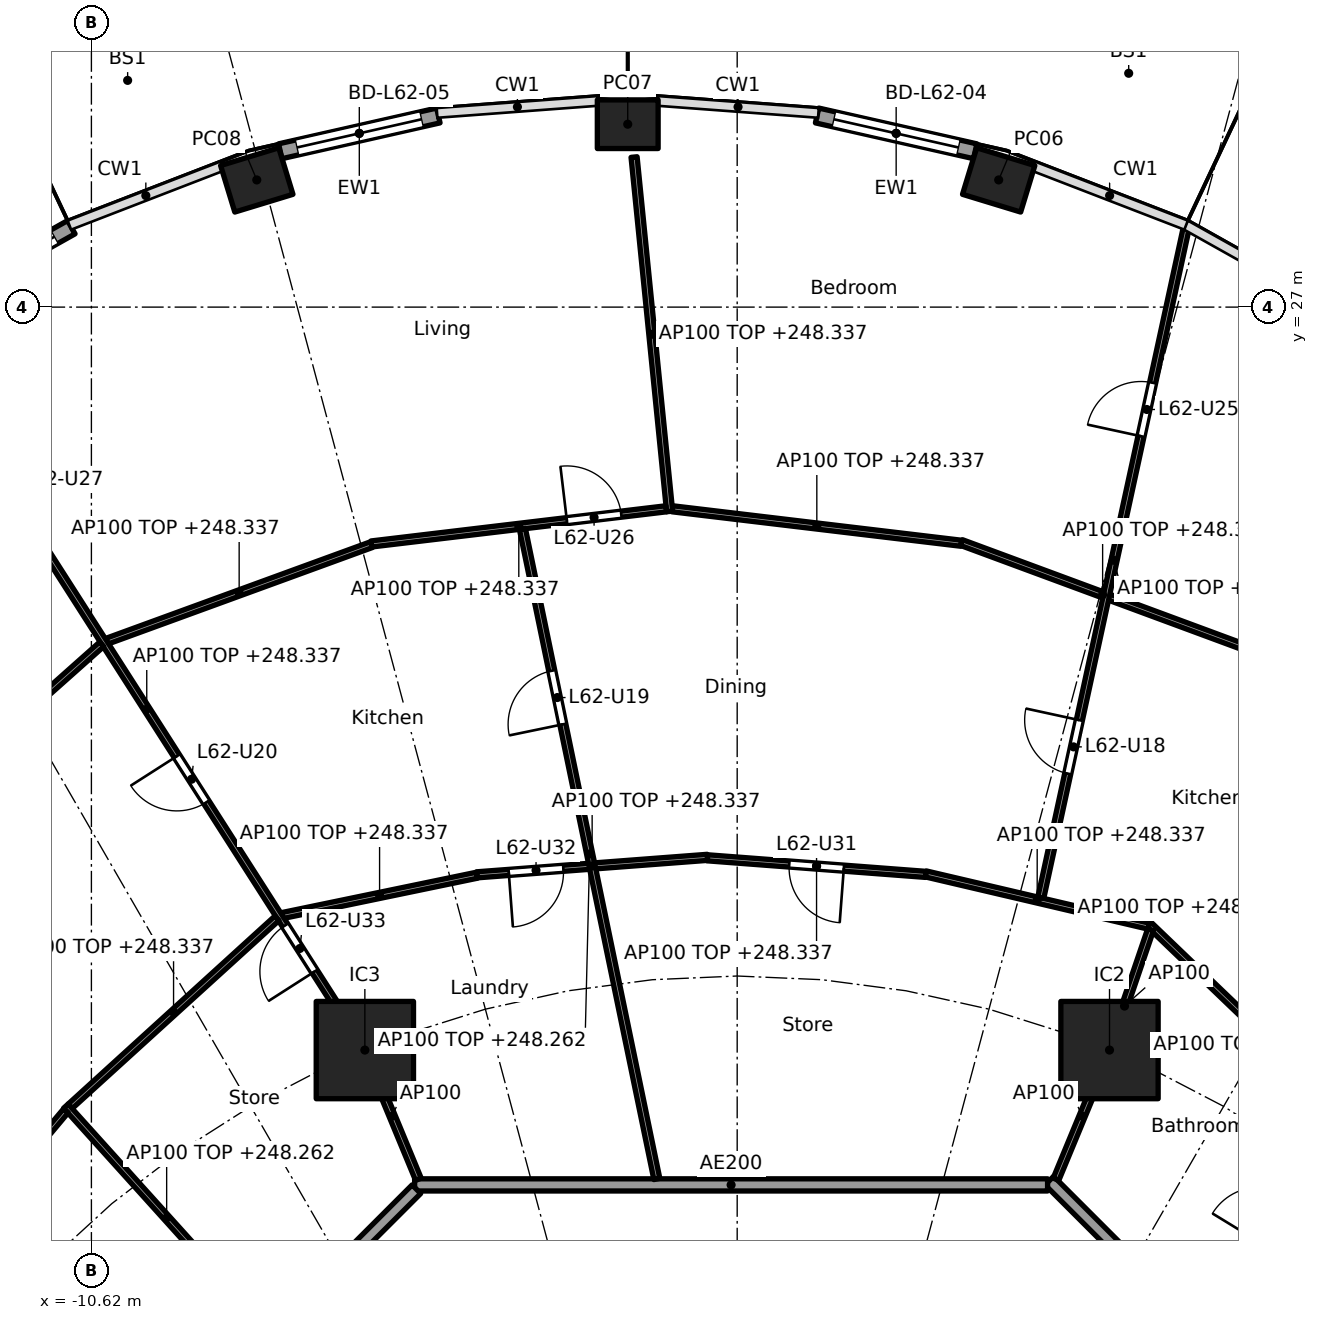
"""IFC4 building model, lengths in metres.
Left out: names, types, materials, properties, quantities, classifications, styles, units other than length and angle.
Written with IfcOpenShell. Run it as: python <this file> out.ifc"""

import sys

from ifc_helpers import new_model, si_unit, direction, frame, frame_2d, origin, origin_2d, place, context, subcontext, project, spatial, rectangle, hollow_rectangle, extrude, element, fill, save


model = new_model("IFC4")
c1 = context("Model", 3, precision=1e-05, world=origin(), true_north=direction((0.0, 1.0)))
c2 = subcontext(c1, "Body", "Model", "MODEL_VIEW")
j1 = project(units=[si_unit("LENGTHUNIT", "METRE"), si_unit("PLANEANGLEUNIT", "RADIAN")], contexts=[c1])
p1 = place(None, origin())
s1 = spatial("IfcSite", under=j1, at=p1, CompositionType="ELEMENT")
p2 = place(p1, origin())
s2 = spatial("IfcBuilding", under=s1, at=p2, CompositionType="ELEMENT")
p3 = place(p2, frame((0.0, 0.0, 245.5)))
s3 = spatial("IfcBuildingStorey", under=s2, at=p3, CompositionType="ELEMENT", Elevation=245.5)
for number, where, z_axis, x_axis in (
    (1, (4.3, 29.092, 0.0), (0.0, 0.0, 1.0), (-0.957, 0.292, 0.0)),
    (2, (-1.8, 30.008, 0.0), (0.0, 0.0, 1.0), (-1.0, 0.0, 0.0)),
    (3, (-7.9, 29.092, 0.0), (0.0, 0.0, 1.0), (-0.957, -0.292, 0.0)),
):
    element("IfcColumn", number, at=place(p3, frame(where, z_axis=z_axis, x_axis=x_axis)), inside=s3, PredefinedType="COLUMN", context=c2, shape_type="SweptSolid", body=[
        extrude(hollow_rectangle(XDim=1.0, YDim=0.8, WallThickness=0.032, at=origin_2d()), origin(), (0.0, 0.0, 1.0), 3.7),
    ])
for number, where, z_axis, x_axis in (
    (4, (6.123, 14.782, 0.0), (0.0, 0.0, 1.0), (1.0, 0.0, 0.0)),
    (5, (-6.123, 14.782, 0.0), (0.0, 0.0, 1.0), (1.0, 0.0, 0.0)),
):
    element("IfcColumn", number, at=place(p3, frame(where, z_axis=z_axis, x_axis=x_axis)), inside=s3, PredefinedType="COLUMN", context=c2, shape_type="SweptSolid", body=[
        extrude(rectangle(XDim=1.6, YDim=1.6, at=origin_2d()), origin(), (0.0, 0.0, 1.0), 3.7),
    ])
p4 = place(p3, frame((1.314, 30.151, 0.0), z_axis=(0.0, 0.0, 1.0), x_axis=(0.975324089124, -0.220777990694, 0.0)))
e6 = element("IfcWall", 6, at=p4, inside=s3, PredefinedType="SOLIDWALL", context=c2, shape_type="SweptSolid", body=[
    extrude(rectangle(XDim=2.666, YDim=0.25, at=frame_2d((1.333, 0.0))), origin(), (0.0, 0.0, 1.0), 3.44),
])
p5 = place(p4, frame((0.283, 0.0, 0.0)))
e7 = element("IfcOpeningElement", 7, at=p5, cuts=e6, PredefinedType="OPENING", context=c2, shape_type="SweptSolid", body=[
    extrude(rectangle(XDim=2.1, YDim=2.4, at=frame_2d((1.05, 1.2))), frame((0.0, 0.135, 0.0), z_axis=(0.0, -1.0, 0.0), x_axis=(1.0, 0.0, 0.0)), (0.0, 0.0, 1.0), 0.27),
])
p6 = place(p3, frame((-7.514, 29.563, 0.0), z_axis=(0.0, 0.0, 1.0), x_axis=(0.975324089124, 0.220777990694, 0.0)))
e8 = element("IfcWall", 8, at=p6, inside=s3, PredefinedType="SOLIDWALL", context=c2, shape_type="SweptSolid", body=[
    extrude(rectangle(XDim=2.666, YDim=0.25, at=frame_2d((1.333, 0.0))), origin(), (0.0, 0.0, 1.0), 3.44),
])
p7 = place(p6, frame((0.283, 0.0, 0.0)))
e9 = element("IfcOpeningElement", 9, at=p7, cuts=e8, PredefinedType="OPENING", context=c2, shape_type="SweptSolid", body=[
    extrude(rectangle(XDim=2.1, YDim=2.4, at=frame_2d((1.05, 1.2))), frame((0.0, 0.135, 0.0), z_axis=(0.0, -1.0, 0.0), x_axis=(1.0, 0.0, 0.0)), (0.0, 0.0, 1.0), 0.27),
])
p8 = place(p3, frame((-13.338, 26.974, 0.0), z_axis=(0.0, 0.0, 1.0), x_axis=(0.872101280701, 0.489325409313, 0.0)))
e10 = element("IfcWall", 10, at=p8, inside=s3, PredefinedType="SOLIDWALL", context=c2, shape_type="SweptSolid", body=[
    extrude(rectangle(XDim=2.738, YDim=0.25, at=frame_2d((1.369, 0.0))), origin(), (0.0, 0.0, 1.0), 3.44),
])
p9 = place(p8, frame((0.319, 0.0, 0.0)))
e11 = element("IfcOpeningElement", 11, at=p9, cuts=e10, PredefinedType="OPENING", context=c2, shape_type="SweptSolid", body=[
    extrude(rectangle(XDim=2.1, YDim=2.4, at=frame_2d((1.05, 1.2))), frame((0.0, 0.135, 0.0), z_axis=(0.0, -1.0, 0.0), x_axis=(1.0, 0.0, 0.0)), (0.0, 0.0, 1.0), 0.27),
])
p10 = place(p3, frame((12.635, 5.134, 0.0), z_axis=(0.0, 0.0, 1.0), x_axis=(-0.707106781187, 0.707106781187, 0.0)))
e12 = element("IfcWall", 12, at=p10, inside=s3, PredefinedType="PARTITIONING", context=c2, shape_type="SweptSolid", body=[
    extrude(rectangle(XDim=10.609, YDim=0.2, at=frame_2d((5.305, 0.0))), origin(), (0.0, 0.0, 1.0), 3.44),
])
p11 = place(p10, frame((4.804, 0.0, 0.0)))
e13 = element("IfcOpeningElement", 13, at=p11, cuts=e12, PredefinedType="OPENING", context=c2, shape_type="SweptSolid", body=[
    extrude(rectangle(XDim=1.0, YDim=2.1, at=frame_2d((0.5, 1.05))), frame((0.0, 0.11, 0.0), z_axis=(0.0, -1.0, 0.0), x_axis=(1.0, 0.0, 0.0)), (0.0, 0.0, 1.0), 0.22),
])
p12 = place(p3, frame((5.104, 12.565, 0.0), z_axis=(0.0, 0.0, 1.0), x_axis=(-1.0, 0.0, 0.0)))
e14 = element("IfcWall", 14, at=p12, inside=s3, PredefinedType="PARTITIONING", context=c2, shape_type="SweptSolid", body=[
    extrude(rectangle(XDim=10.409, YDim=0.2, at=frame_2d((5.205, 0.0))), origin(), (0.0, 0.0, 1.0), 3.44),
])
p13 = place(p3, frame((-5.275, 12.494, 0.0), z_axis=(0.0, 0.0, 1.0), x_axis=(-0.707106781187, -0.707106781187, 0.0)))
e15 = element("IfcWall", 15, at=p13, inside=s3, PredefinedType="PARTITIONING", context=c2, shape_type="SweptSolid", body=[
    extrude(rectangle(XDim=10.209, YDim=0.2, at=frame_2d((5.104, 0.0))), origin(), (0.0, 0.0, 1.0), 3.44),
])
p14 = place(p3, frame((7.71, 10.197, 0.0), z_axis=(0.0, 0.0, 1.0), x_axis=(0.521477621335, 0.853264959111, 0.0)))
e16 = element("IfcWall", 16, at=p14, inside=s3, PredefinedType="PARTITIONING", context=c2, shape_type="SweptSolid", body=[
    extrude(rectangle(XDim=8.941, YDim=0.1, at=frame_2d((4.471, 0.0))), origin(), (0.0, 0.0, 1.0), 2.762),
])
p15 = place(p14, frame((1.675, 0.0, 0.0)))
e17 = element("IfcOpeningElement", 17, at=p15, cuts=e16, PredefinedType="OPENING", context=c2, shape_type="SweptSolid", body=[
    extrude(rectangle(XDim=0.9, YDim=2.1, at=frame_2d((0.45, 1.05))), frame((0.0, 0.06, 0.0), z_axis=(0.0, -1.0, 0.0), x_axis=(1.0, 0.0, 0.0)), (0.0, 0.0, 1.0), 0.12),
])
p16 = place(p14, frame((6.121, 0.0, 0.0)))
e18 = element("IfcOpeningElement", 18, at=p16, cuts=e16, PredefinedType="OPENING", context=c2, shape_type="SweptSolid", body=[
    extrude(rectangle(XDim=0.9, YDim=2.1, at=frame_2d((0.45, 1.05))), frame((0.0, 0.06, 0.0), z_axis=(0.0, -1.0, 0.0), x_axis=(1.0, 0.0, 0.0)), (0.0, 0.0, 1.0), 0.12),
])
p17 = place(p3, frame((9.89, 13.858, 0.0), z_axis=(0.0, 0.0, 1.0), x_axis=(-0.72167233993, 0.692234811159, 0.0)))
e19 = element("IfcWall", 19, at=p17, inside=s3, PredefinedType="PARTITIONING", context=c2, shape_type="SweptSolid", body=[
    extrude(rectangle(XDim=4.313, YDim=0.1, at=frame_2d((2.156, 0.0))), origin(), (0.0, 0.0, 1.0), 2.837),
])
p18 = place(p3, frame((5.243, 12.657, 0.0), z_axis=(0.0, 0.0, 1.0), x_axis=(0.382719158442, 0.923864733477, 0.0)))
e20 = element("IfcWall", 20, at=p18, inside=s3, PredefinedType="PARTITIONING", context=c2, shape_type="SweptSolid", body=[
    extrude(rectangle(XDim=2.25, YDim=0.1, at=frame_2d((1.125, 0.0))), origin(), (0.0, 0.0, 1.0), 3.44),
])
p19 = place(p3, frame((6.139, 14.829, 0.0), z_axis=(0.0, 0.0, 1.0), x_axis=(0.32278593828, 0.946471995385, 0.0)))
e21 = element("IfcWall", 21, at=p19, inside=s3, PredefinedType="PARTITIONING", context=c2, shape_type="SweptSolid", body=[
    extrude(rectangle(XDim=2.042, YDim=0.1, at=frame_2d((1.021, 0.0))), origin(), (0.0, 0.0, 1.0), 3.44),
])
p20 = place(p3, frame((6.766, 16.82, 0.0), z_axis=(0.0, 0.0, 1.0), x_axis=(-0.973620139133, 0.228174986961, 0.0)))
e22 = element("IfcWall", 22, at=p20, inside=s3, PredefinedType="PARTITIONING", context=c2, shape_type="SweptSolid", body=[
    extrude(rectangle(XDim=3.763, YDim=0.1, at=frame_2d((1.882, 0.0))), origin(), (0.0, 0.0, 1.0), 2.837),
])
p21 = place(p3, frame((8.331, 21.411, 0.0), z_axis=(0.0, 0.0, 1.0), x_axis=(-0.937892657706, 0.346925586575, 0.0)))
e23 = element("IfcWall", 23, at=p21, inside=s3, PredefinedType="PARTITIONING", context=c2, shape_type="SweptSolid", body=[
    extrude(rectangle(XDim=4.95, YDim=0.1, at=frame_2d((2.475, 0.0))), origin(), (0.0, 0.0, 1.0), 2.837),
])
p22 = place(p3, frame((4.993, 17.287, 0.0), z_axis=(0.0, 0.0, 1.0), x_axis=(0.21221094606, 0.977223881397, 0.0)))
e24 = element("IfcWall", 24, at=p22, inside=s3, PredefinedType="PARTITIONING", context=c2, shape_type="SweptSolid", body=[
    extrude(rectangle(XDim=11.355, YDim=0.1, at=frame_2d((5.677, 0.0))), origin(), (0.0, 0.0, 1.0), 2.983),
])
p23 = place(p22, frame((2.089, 0.0, 0.0)))
e25 = element("IfcOpeningElement", 25, at=p23, cuts=e24, PredefinedType="OPENING", context=c2, shape_type="SweptSolid", body=[
    extrude(rectangle(XDim=0.9, YDim=2.1, at=frame_2d((0.45, 1.05))), frame((0.0, 0.06, 0.0), z_axis=(0.0, -1.0, 0.0), x_axis=(1.0, 0.0, 0.0)), (0.0, 0.0, 1.0), 0.12),
])
p24 = place(p22, frame((7.767, 0.0, 0.0)))
e26 = element("IfcOpeningElement", 26, at=p24, cuts=e24, PredefinedType="OPENING", context=c2, shape_type="SweptSolid", body=[
    extrude(rectangle(XDim=0.9, YDim=2.1, at=frame_2d((0.45, 1.05))), frame((0.0, 0.06, 0.0), z_axis=(0.0, -1.0, 0.0), x_axis=(1.0, 0.0, 0.0)), (0.0, 0.0, 1.0), 0.12),
])
p25 = place(p3, frame((3.101, 17.671, 0.0), z_axis=(0.0, 0.0, 1.0), x_axis=(-0.997133705575, 0.075659587668, 0.0)))
e27 = element("IfcWall", 27, at=p25, inside=s3, PredefinedType="PARTITIONING", context=c2, shape_type="SweptSolid", body=[
    extrude(rectangle(XDim=3.601, YDim=0.1, at=frame_2d((1.801, 0.0))), origin(), (0.0, 0.0, 1.0), 2.837),
])
p26 = place(p25, frame((1.351, 0.0, 0.0)))
e28 = element("IfcOpeningElement", 28, at=p26, cuts=e27, PredefinedType="OPENING", context=c2, shape_type="SweptSolid", body=[
    extrude(rectangle(XDim=0.9, YDim=2.1, at=frame_2d((0.45, 1.05))), frame((0.0, 0.06, 0.0), z_axis=(0.0, -1.0, 0.0), x_axis=(1.0, 0.0, 0.0)), (0.0, 0.0, 1.0), 0.12),
])
p27 = place(p3, frame((3.686, 23.117, 0.0), z_axis=(0.0, 0.0, 1.0), x_axis=(-0.992965872314, 0.11840091393, 0.0)))
e29 = element("IfcWall", 29, at=p27, inside=s3, PredefinedType="PARTITIONING", context=c2, shape_type="SweptSolid", body=[
    extrude(rectangle(XDim=4.786, YDim=0.1, at=frame_2d((2.393, 0.0))), origin(), (0.0, 0.0, 1.0), 2.837),
])
p28 = place(p3, frame((-0.49, 17.951, 0.0), z_axis=(0.0, 0.0, 1.0), x_axis=(-0.99713329702, -0.075664971907, 0.0)))
e30 = element("IfcWall", 30, at=p28, inside=s3, PredefinedType="PARTITIONING", context=c2, shape_type="SweptSolid", body=[
    extrude(rectangle(XDim=3.801, YDim=0.1, at=frame_2d((1.9, 0.0))), origin(), (0.0, 0.0, 1.0), 2.837),
])
p29 = place(p28, frame((2.376, 0.0, 0.0)))
e31 = element("IfcOpeningElement", 31, at=p29, cuts=e30, PredefinedType="OPENING", context=c2, shape_type="SweptSolid", body=[
    extrude(rectangle(XDim=0.9, YDim=2.1, at=frame_2d((0.45, 1.05))), frame((0.0, 0.06, 0.0), z_axis=(0.0, -1.0, 0.0), x_axis=(1.0, 0.0, 0.0)), (0.0, 0.0, 1.0), 0.12),
])
p30 = place(p3, frame((-1.111, 23.64, 0.0), z_axis=(0.0, 0.0, 1.0), x_axis=(-0.099784339691, 0.995009088176, 0.0)))
e32 = element("IfcWall", 32, at=p30, inside=s3, PredefinedType="PARTITIONING", context=c2, shape_type="SweptSolid", body=[
    extrude(rectangle(XDim=5.857, YDim=0.1, at=frame_2d((2.929, 0.0))), origin(), (0.0, 0.0, 1.0), 2.837),
])
p31 = place(p3, frame((-1.166, 23.683, 0.0), z_axis=(0.0, 0.0, 1.0), x_axis=(-0.992961712415, -0.118435795593, 0.0)))
e33 = element("IfcWall", 33, at=p31, inside=s3, PredefinedType="PARTITIONING", context=c2, shape_type="SweptSolid", body=[
    extrude(rectangle(XDim=4.885, YDim=0.1, at=frame_2d((2.443, 0.0))), origin(), (0.0, 0.0, 1.0), 2.837),
])
p32 = place(p31, frame((0.746, 0.0, 0.0)))
e34 = element("IfcOpeningElement", 34, at=p32, cuts=e33, PredefinedType="OPENING", context=c2, shape_type="SweptSolid", body=[
    extrude(rectangle(XDim=0.9, YDim=2.1, at=frame_2d((0.45, 1.05))), frame((0.0, 0.06, 0.0), z_axis=(0.0, -1.0, 0.0), x_axis=(1.0, 0.0, 0.0)), (0.0, 0.0, 1.0), 0.12),
])
p33 = place(p3, frame((-1.321, 12.663, 0.0), z_axis=(0.0, 0.0, 1.0), x_axis=(-0.202499831859, 0.979282297449, 0.0)))
e35 = element("IfcWall", 35, at=p33, inside=s3, PredefinedType="PARTITIONING", context=c2, shape_type="SweptSolid", body=[
    extrude(rectangle(XDim=10.915, YDim=0.1, at=frame_2d((5.457, 0.0))), origin(), (0.0, 0.0, 1.0), 2.762),
])
p34 = place(p33, frame((7.634, 0.0, 0.0)))
e36 = element("IfcOpeningElement", 36, at=p34, cuts=e35, PredefinedType="OPENING", context=c2, shape_type="SweptSolid", body=[
    extrude(rectangle(XDim=0.9, YDim=2.1, at=frame_2d((0.45, 1.05))), frame((0.0, 0.06, 0.0), z_axis=(0.0, -1.0, 0.0), x_axis=(1.0, 0.0, 0.0)), (0.0, 0.0, 1.0), 0.12),
])
p35 = place(p3, frame((-4.28, 17.657, 0.0), z_axis=(0.0, 0.0, 1.0), x_axis=(-0.979205232861, -0.202872156637, 0.0)))
e37 = element("IfcWall", 37, at=p35, inside=s3, PredefinedType="PARTITIONING", context=c2, shape_type="SweptSolid", body=[
    extrude(rectangle(XDim=3.271, YDim=0.1, at=frame_2d((1.635, 0.0))), origin(), (0.0, 0.0, 1.0), 2.837),
])
p36 = place(p3, frame((-6.014, 23.094, 0.0), z_axis=(0.0, 0.0, 1.0), x_axis=(-0.939417400947, -0.342775359089, 0.0)))
e38 = element("IfcWall", 38, at=p36, inside=s3, PredefinedType="PARTITIONING", context=c2, shape_type="SweptSolid", body=[
    extrude(rectangle(XDim=4.633, YDim=0.1, at=frame_2d((2.316, 0.0))), origin(), (0.0, 0.0, 1.0), 2.837),
])
p37 = place(p3, frame((-5.243, 12.657, 0.0), z_axis=(0.0, 0.0, 1.0), x_axis=(-0.382757529444, 0.923848837015, 0.0)))
e39 = element("IfcWall", 39, at=p37, inside=s3, PredefinedType="PARTITIONING", context=c2, shape_type="SweptSolid", body=[
    extrude(rectangle(XDim=2.25, YDim=0.1, at=frame_2d((1.125, 0.0))), origin(), (0.0, 0.0, 1.0), 3.44),
])
p38 = place(p3, frame((-6.15, 14.824, 0.0), z_axis=(0.0, 0.0, 1.0), x_axis=(-0.538870687577, 0.842388498301, 0.0)))
e40 = element("IfcWall", 40, at=p38, inside=s3, PredefinedType="PARTITIONING", context=c2, shape_type="SweptSolid", body=[
    extrude(rectangle(XDim=13.213, YDim=0.1, at=frame_2d((6.606, 0.0))), origin(), (0.0, 0.0, 1.0), 2.837),
])
p39 = place(p38, frame((4.787, 0.0, 0.0)))
e41 = element("IfcOpeningElement", 41, at=p39, cuts=e40, PredefinedType="OPENING", context=c2, shape_type="SweptSolid", body=[
    extrude(rectangle(XDim=0.9, YDim=2.1, at=frame_2d((0.45, 1.05))), frame((0.0, 0.06, 0.0), z_axis=(0.0, -1.0, 0.0), x_axis=(1.0, 0.0, 0.0)), (0.0, 0.0, 1.0), 0.12),
])
p40 = place(p38, frame((10.112, 0.0, 0.0)))
e42 = element("IfcOpeningElement", 42, at=p40, cuts=e40, PredefinedType="OPENING", context=c2, shape_type="SweptSolid", body=[
    extrude(rectangle(XDim=0.9, YDim=2.1, at=frame_2d((0.45, 1.05))), frame((0.0, 0.06, 0.0), z_axis=(0.0, -1.0, 0.0), x_axis=(1.0, 0.0, 0.0)), (0.0, 0.0, 1.0), 0.12),
])
p41 = place(p38, frame((1.483, 0.0, 0.0)))
e43 = element("IfcOpeningElement", 43, at=p41, cuts=e40, PredefinedType="OPENING", context=c2, shape_type="SweptSolid", body=[
    extrude(rectangle(XDim=0.9, YDim=2.1, at=frame_2d((0.45, 1.05))), frame((0.0, 0.06, 0.0), z_axis=(0.0, -1.0, 0.0), x_axis=(1.0, 0.0, 0.0)), (0.0, 0.0, 1.0), 0.12),
])
p42 = place(p3, frame((-7.568, 16.95, 0.0), z_axis=(0.0, 0.0, 1.0), x_axis=(-0.739848749506, -0.672773236577, 0.0)))
e44 = element("IfcWall", 44, at=p42, inside=s3, PredefinedType="PARTITIONING", context=c2, shape_type="SweptSolid", body=[
    extrude(rectangle(XDim=4.597, YDim=0.1, at=frame_2d((2.299, 0.0))), origin(), (0.0, 0.0, 1.0), 2.837),
])
p43 = place(p3, frame((-10.45, 21.455, 0.0), z_axis=(0.0, 0.0, 1.0), x_axis=(-0.747155565726, -0.664649201162, 0.0)))
e45 = element("IfcWall", 45, at=p43, inside=s3, PredefinedType="PARTITIONING", context=c2, shape_type="SweptSolid", body=[
    extrude(rectangle(XDim=5.575, YDim=0.1, at=frame_2d((2.788, 0.0))), origin(), (0.0, 0.0, 1.0), 2.837),
])
p44 = place(p3, frame((-7.725, 10.186, 0.0), z_axis=(0.0, 0.0, 1.0), x_axis=(-0.669817301526, 0.742525947409, 0.0)))
e46 = element("IfcWall", 46, at=p44, inside=s3, PredefinedType="PARTITIONING", context=c2, shape_type="SweptSolid", body=[
    extrude(rectangle(XDim=4.949, YDim=0.1, at=frame_2d((2.475, 0.0))), origin(), (0.0, 0.0, 1.0), 2.762),
])
p45 = place(p3, frame((-11.039, 13.785, 0.0), z_axis=(0.0, 0.0, 1.0), x_axis=(-0.642258090087, -0.766488451131, 0.0)))
e47 = element("IfcWall", 47, at=p45, inside=s3, PredefinedType="PARTITIONING", context=c2, shape_type="SweptSolid", body=[
    extrude(rectangle(XDim=4.361, YDim=0.1, at=frame_2d((2.18, 0.0))), origin(), (0.0, 0.0, 1.0), 2.837),
])
p46 = place(p5, origin())
e48 = element("IfcDoor", 48, at=p46, inside=s3, OperationType="SLIDING_TO_LEFT", PredefinedType="DOOR", context=c2, shape_type="SweptSolid", body=[
    extrude(rectangle(XDim=2.1, YDim=2.4, at=frame_2d((1.05, 1.2))), frame((0.0, 0.025, 0.0), z_axis=(0.0, -1.0, 0.0), x_axis=(1.0, 0.0, 0.0)), (0.0, 0.0, 1.0), 0.05),
])
fill(e7, e48)
p47 = place(p7, origin())
e49 = element("IfcDoor", 49, at=p47, inside=s3, OperationType="SLIDING_TO_LEFT", PredefinedType="DOOR", context=c2, shape_type="SweptSolid", body=[
    extrude(rectangle(XDim=2.1, YDim=2.4, at=frame_2d((1.05, 1.2))), frame((0.0, 0.025, 0.0), z_axis=(0.0, -1.0, 0.0), x_axis=(1.0, 0.0, 0.0)), (0.0, 0.0, 1.0), 0.05),
])
fill(e9, e49)
p48 = place(p9, origin())
e50 = element("IfcDoor", 50, at=p48, inside=s3, OperationType="SLIDING_TO_LEFT", PredefinedType="DOOR", context=c2, shape_type="SweptSolid", body=[
    extrude(rectangle(XDim=2.1, YDim=2.4, at=frame_2d((1.05, 1.2))), frame((0.0, 0.025, 0.0), z_axis=(0.0, -1.0, 0.0), x_axis=(1.0, 0.0, 0.0)), (0.0, 0.0, 1.0), 0.05),
])
fill(e11, e50)
p49 = place(p23, origin())
e51 = element("IfcDoor", 51, at=p49, inside=s3, OperationType="SINGLE_SWING_RIGHT", PredefinedType="DOOR", context=c2, shape_type="SweptSolid", body=[
    extrude(rectangle(XDim=0.9, YDim=2.1, at=frame_2d((0.45, 1.05))), frame((0.0, 0.025, 0.0), z_axis=(0.0, -1.0, 0.0), x_axis=(1.0, 0.0, 0.0)), (0.0, 0.0, 1.0), 0.05),
])
fill(e25, e51)
p50 = place(p34, origin())
e52 = element("IfcDoor", 52, at=p50, inside=s3, OperationType="SINGLE_SWING_LEFT", PredefinedType="DOOR", context=c2, shape_type="SweptSolid", body=[
    extrude(rectangle(XDim=0.9, YDim=2.1, at=frame_2d((0.45, 1.05))), frame((0.0, 0.025, 0.0), z_axis=(0.0, -1.0, 0.0), x_axis=(1.0, 0.0, 0.0)), (0.0, 0.0, 1.0), 0.05),
])
fill(e36, e52)
p51 = place(p39, origin())
e53 = element("IfcDoor", 53, at=p51, inside=s3, OperationType="SINGLE_SWING_RIGHT", PredefinedType="DOOR", context=c2, shape_type="SweptSolid", body=[
    extrude(rectangle(XDim=0.9, YDim=2.1, at=frame_2d((0.45, 1.05))), frame((0.0, 0.025, 0.0), z_axis=(0.0, -1.0, 0.0), x_axis=(1.0, 0.0, 0.0)), (0.0, 0.0, 1.0), 0.05),
])
fill(e41, e53)
p52 = place(p24, origin())
e54 = element("IfcDoor", 54, at=p52, inside=s3, OperationType="SINGLE_SWING_LEFT", PredefinedType="DOOR", context=c2, shape_type="SweptSolid", body=[
    extrude(rectangle(XDim=0.9, YDim=2.1, at=frame_2d((0.45, 1.05))), frame((0.0, 0.025, 0.0), z_axis=(0.0, -1.0, 0.0), x_axis=(1.0, 0.0, 0.0)), (0.0, 0.0, 1.0), 0.05),
])
fill(e26, e54)
p53 = place(p32, frame((0.9, 0.0, 0.0), x_axis=(-1.0, 0.0, 0.0)))
e55 = element("IfcDoor", 55, at=p53, inside=s3, OperationType="SINGLE_SWING_LEFT", PredefinedType="DOOR", context=c2, shape_type="SweptSolid", body=[
    extrude(rectangle(XDim=0.9, YDim=2.1, at=frame_2d((0.45, 1.05))), frame((0.0, 0.025, 0.0), z_axis=(0.0, -1.0, 0.0), x_axis=(1.0, 0.0, 0.0)), (0.0, 0.0, 1.0), 0.05),
])
fill(e34, e55)
p54 = place(p26, origin())
e56 = element("IfcDoor", 56, at=p54, inside=s3, OperationType="SINGLE_SWING_LEFT", PredefinedType="DOOR", context=c2, shape_type="SweptSolid", body=[
    extrude(rectangle(XDim=0.9, YDim=2.1, at=frame_2d((0.45, 1.05))), frame((0.0, 0.025, 0.0), z_axis=(0.0, -1.0, 0.0), x_axis=(1.0, 0.0, 0.0)), (0.0, 0.0, 1.0), 0.05),
])
fill(e28, e56)
p55 = place(p29, origin())
e57 = element("IfcDoor", 57, at=p55, inside=s3, OperationType="SINGLE_SWING_RIGHT", PredefinedType="DOOR", context=c2, shape_type="SweptSolid", body=[
    extrude(rectangle(XDim=0.9, YDim=2.1, at=frame_2d((0.45, 1.05))), frame((0.0, 0.025, 0.0), z_axis=(0.0, -1.0, 0.0), x_axis=(1.0, 0.0, 0.0)), (0.0, 0.0, 1.0), 0.05),
])
fill(e31, e57)
p56 = place(p41, origin())
e58 = element("IfcDoor", 58, at=p56, inside=s3, OperationType="SINGLE_SWING_LEFT", PredefinedType="DOOR", context=c2, shape_type="SweptSolid", body=[
    extrude(rectangle(XDim=0.9, YDim=2.1, at=frame_2d((0.45, 1.05))), frame((0.0, 0.025, 0.0), z_axis=(0.0, -1.0, 0.0), x_axis=(1.0, 0.0, 0.0)), (0.0, 0.0, 1.0), 0.05),
])
fill(e43, e58)
save(model, sys.argv[1])
